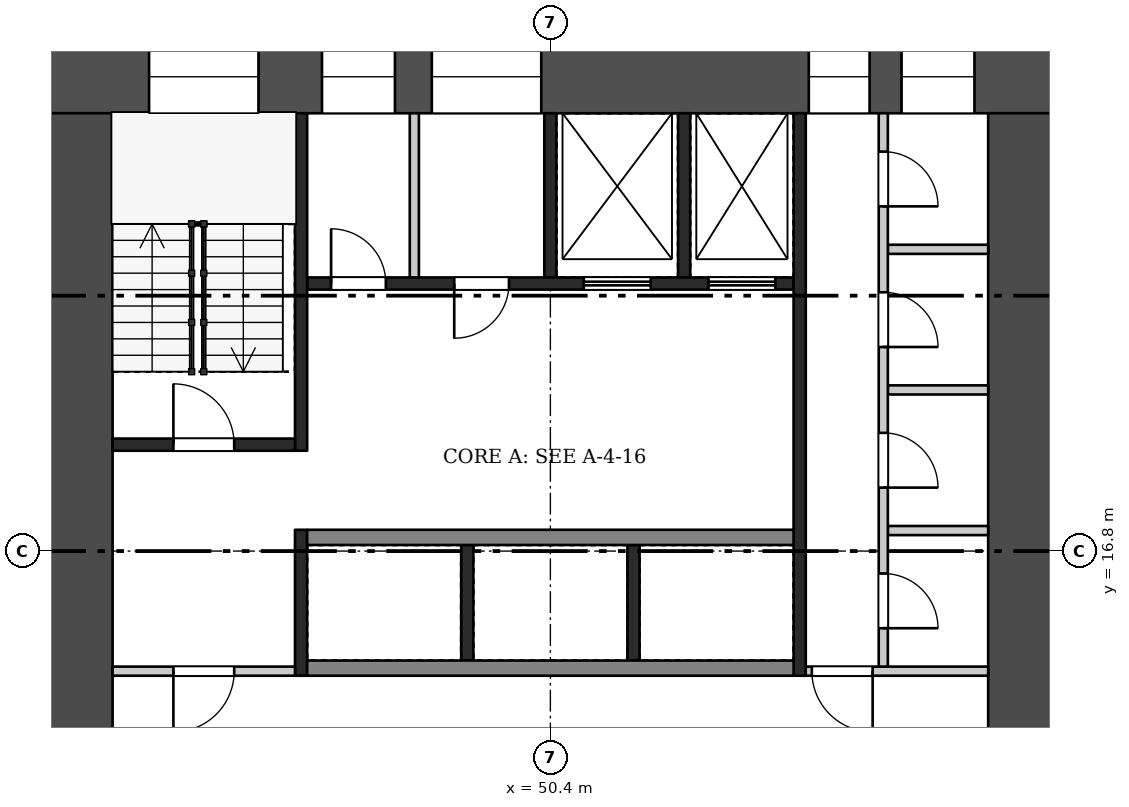
"""IFC4 building model, lengths in metres.
Left out: names, types, materials, properties, quantities, classifications, styles, units other than length and angle.
Written with IfcOpenShell. Run it as: python <this file> out.ifc"""

import sys

from ifc_helpers import new_model, si_unit, direction, frame, frame_2d, origin, place, context, subcontext, project, spatial, rectangle, extrude, element, fill, save


model = new_model("IFC4")
c1 = context("Model", 3, precision=1e-05, world=origin(), true_north=direction((0.0, 1.0)))
c2 = subcontext(c1, "Body", "Model", "MODEL_VIEW")
j1 = project(units=[si_unit("LENGTHUNIT", "METRE"), si_unit("PLANEANGLEUNIT", "RADIAN")], contexts=[c1])
p1 = place(None, origin())
s1 = spatial("IfcSite", under=j1, at=p1, CompositionType="ELEMENT")
p2 = place(p1, origin())
s2 = spatial("IfcBuilding", under=s1, at=p2, CompositionType="ELEMENT")
p3 = place(p2, frame((0.0, 0.0, 91.7)))
s3 = spatial("IfcBuildingStorey", under=s2, at=p3, CompositionType="ELEMENT", Elevation=91.7)
p4 = place(p3, frame((42.0, 24.6, 0.0), z_axis=(0.0, 0.0, 1.0), x_axis=(1.0, 0.0, 0.0)))
e1 = element("IfcWall", 1, at=p4, inside=s3, PredefinedType="SHEAR", context=c2, shape_type="SweptSolid", body=[
    extrude(rectangle(XDim=16.8, YDim=1.2, at=frame_2d((8.4, 0.0))), origin(), (0.0, 0.0, 1.0), 3.22),
])
p5 = place(p4, frame((1.8, 0.0, 0.5)))
e2 = element("IfcOpeningElement", 2, at=p5, cuts=e1, PredefinedType="OPENING", context=c2, shape_type="SweptSolid", body=[
    extrude(rectangle(XDim=1.8, YDim=2.4, at=frame_2d((0.9, 1.2))), frame((0.0, 0.61, 0.0), z_axis=(0.0, -1.0, 0.0), x_axis=(1.0, 0.0, 0.0)), (0.0, 0.0, 1.0), 1.22),
])
p6 = place(p4, frame((4.644, 0.0, 1.6)))
e3 = element("IfcOpeningElement", 3, at=p6, cuts=e1, PredefinedType="OPENING", context=c2, shape_type="SweptSolid", body=[
    extrude(rectangle(XDim=1.2, YDim=1.2, at=frame_2d((0.6, 0.6))), frame((0.0, 0.61, 0.0), z_axis=(0.0, -1.0, 0.0), x_axis=(1.0, 0.0, 0.0)), (0.0, 0.0, 1.0), 1.22),
])
p7 = place(p4, frame((6.45, 0.0, 1.6)))
e4 = element("IfcOpeningElement", 4, at=p7, cuts=e1, PredefinedType="OPENING", context=c2, shape_type="SweptSolid", body=[
    extrude(rectangle(XDim=1.8, YDim=1.2, at=frame_2d((0.9, 0.6))), frame((0.0, 0.61, 0.0), z_axis=(0.0, -1.0, 0.0), x_axis=(1.0, 0.0, 0.0)), (0.0, 0.0, 1.0), 1.22),
])
p8 = place(p4, frame((12.65, 0.0, 0.6)))
e5 = element("IfcOpeningElement", 5, at=p8, cuts=e1, PredefinedType="OPENING", context=c2, shape_type="SweptSolid", body=[
    extrude(rectangle(XDim=1.0, YDim=2.1, at=frame_2d((0.5, 1.05))), frame((0.0, 0.61, 0.0), z_axis=(0.0, -1.0, 0.0), x_axis=(1.0, 0.0, 0.0)), (0.0, 0.0, 1.0), 1.22),
])
p9 = place(p4, frame((14.175, 0.0, 1.6)))
e6 = element("IfcOpeningElement", 6, at=p9, cuts=e1, PredefinedType="OPENING", context=c2, shape_type="SweptSolid", body=[
    extrude(rectangle(XDim=1.2, YDim=1.2, at=frame_2d((0.6, 0.6))), frame((0.0, 0.61, 0.0), z_axis=(0.0, -1.0, 0.0), x_axis=(1.0, 0.0, 0.0)), (0.0, 0.0, 1.0), 1.22),
])
p10 = place(p3, frame((42.6, 9.6, 0.0), z_axis=(0.0, 0.0, 1.0), x_axis=(0.0, 1.0, 0.0)))
e7 = element("IfcWall", 7, at=p10, inside=s3, PredefinedType="SHEAR", context=c2, shape_type="SweptSolid", body=[
    extrude(rectangle(XDim=14.4, YDim=1.2, at=frame_2d((7.2, 0.0))), origin(), (0.0, 0.0, 1.0), 3.22),
])
p11 = place(p10, frame((2.1, 0.0, 0.0)))
e8 = element("IfcOpeningElement", 8, at=p11, cuts=e7, PredefinedType="OPENING", context=c2, shape_type="SweptSolid", body=[
    extrude(rectangle(XDim=1.8, YDim=2.1, at=frame_2d((0.9, 1.05))), frame((0.0, 0.61, 0.0), z_axis=(0.0, -1.0, 0.0), x_axis=(1.0, 0.0, 0.0)), (0.0, 0.0, 1.0), 1.22),
])
p12 = place(p3, frame((58.2, 9.6, 0.0), z_axis=(0.0, 0.0, 1.0), x_axis=(0.0, 1.0, 0.0)))
e9 = element("IfcWall", 9, at=p12, inside=s3, PredefinedType="SHEAR", context=c2, shape_type="SweptSolid", body=[
    extrude(rectangle(XDim=14.4, YDim=1.2, at=frame_2d((7.2, 0.0))), origin(), (0.0, 0.0, 1.0), 3.22),
])
p13 = place(p12, frame((2.1, 0.0, 0.0)))
e10 = element("IfcOpeningElement", 10, at=p13, cuts=e9, PredefinedType="OPENING", context=c2, shape_type="SweptSolid", body=[
    extrude(rectangle(XDim=1.8, YDim=2.1, at=frame_2d((0.9, 1.05))), frame((0.0, 0.61, 0.0), z_axis=(0.0, -1.0, 0.0), x_axis=(1.0, 0.0, 0.0)), (0.0, 0.0, 1.0), 1.22),
])
for number, where, z_axis, x_axis in (
    (11, (49.033, 15.0, 0.0), (0.0, 0.0, 1.0), (0.0, 1.0, 0.0)),
    (12, (51.767, 15.0, 0.0), (0.0, 0.0, 1.0), (0.0, 1.0, 0.0)),
):
    element("IfcWall", number, at=place(p3, frame(where, z_axis=z_axis, x_axis=x_axis)), inside=s3, PredefinedType="SHEAR", context=c2, shape_type="SweptSolid", body=[
        extrude(rectangle(XDim=1.9, YDim=0.2, at=frame_2d((0.95, 0.0))), origin(), (0.0, 0.0, 1.0), 3.22),
    ])
for number, where, z_axis, x_axis in (
    (13, (46.4, 14.875, 0.0), (0.0, 0.0, 1.0), (1.0, 0.0, 0.0)),
    (14, (46.4, 17.025, 0.0), (0.0, 0.0, 1.0), (1.0, 0.0, 0.0)),
):
    element("IfcWall", number, at=place(p3, frame(where, z_axis=z_axis, x_axis=x_axis)), inside=s3, PredefinedType="SHEAR", context=c2, shape_type="SweptSolid", body=[
        extrude(rectangle(XDim=8.0, YDim=0.25, at=frame_2d((4.0, 0.0))), origin(), (0.0, 0.0, 1.0), 3.22),
    ])
for number, where, z_axis, x_axis in (
    (15, (50.4, 21.3, 0.0), (0.0, 0.0, 1.0), (0.0, 1.0, 0.0)),
    (16, (52.6, 21.3, 0.0), (0.0, 0.0, 1.0), (0.0, 1.0, 0.0)),
):
    element("IfcWall", number, at=place(p3, frame(where, z_axis=z_axis, x_axis=x_axis)), inside=s3, PredefinedType="SHEAR", context=c2, shape_type="SweptSolid", body=[
        extrude(rectangle(XDim=2.7, YDim=0.2, at=frame_2d((1.35, 0.0))), origin(), (0.0, 0.0, 1.0), 3.22),
    ])
p14 = place(p3, frame((48.163, 21.3, 0.0), z_axis=(0.0, 0.0, 1.0), x_axis=(0.0, 1.0, 0.0)))
e17 = element("IfcWall", 17, at=p14, inside=s3, PredefinedType="PARTITIONING", context=c2, shape_type="SweptSolid", body=[
    extrude(rectangle(XDim=2.7, YDim=0.15, at=frame_2d((1.35, 0.0))), origin(), (0.0, 0.0, 1.0), 3.22),
])
p15 = place(p3, frame((46.4, 21.2, 0.0), z_axis=(0.0, 0.0, 1.0), x_axis=(1.0, 0.0, 0.0)))
e18 = element("IfcWall", 18, at=p15, inside=s3, PredefinedType="SHEAR", context=c2, shape_type="SweptSolid", body=[
    extrude(rectangle(XDim=8.0, YDim=0.2, at=frame_2d((4.0, 0.0))), origin(), (0.0, 0.0, 1.0), 3.22),
])
p16 = place(p15, frame((0.394, 0.0, 0.0)))
e19 = element("IfcOpeningElement", 19, at=p16, cuts=e18, PredefinedType="OPENING", context=c2, shape_type="SweptSolid", body=[
    extrude(rectangle(XDim=0.9, YDim=2.1, at=frame_2d((0.45, 1.05))), frame((0.0, 0.11, 0.0), z_axis=(0.0, -1.0, 0.0), x_axis=(1.0, 0.0, 0.0)), (0.0, 0.0, 1.0), 0.22),
])
p17 = place(p15, frame((2.419, 0.0, 0.0)))
e20 = element("IfcOpeningElement", 20, at=p17, cuts=e18, PredefinedType="OPENING", context=c2, shape_type="SweptSolid", body=[
    extrude(rectangle(XDim=0.9, YDim=2.1, at=frame_2d((0.45, 1.05))), frame((0.0, 0.11, 0.0), z_axis=(0.0, -1.0, 0.0), x_axis=(1.0, 0.0, 0.0)), (0.0, 0.0, 1.0), 0.22),
])
p18 = place(p15, frame((4.55, 0.0, 0.0)))
e21 = element("IfcOpeningElement", 21, at=p18, cuts=e18, PredefinedType="OPENING", context=c2, shape_type="SweptSolid", body=[
    extrude(rectangle(XDim=1.1, YDim=2.1, at=frame_2d((0.55, 1.05))), frame((0.0, 0.11, 0.0), z_axis=(0.0, -1.0, 0.0), x_axis=(1.0, 0.0, 0.0)), (0.0, 0.0, 1.0), 0.22),
])
p19 = place(p15, frame((6.6, 0.0, 0.0)))
e22 = element("IfcOpeningElement", 22, at=p19, cuts=e18, PredefinedType="OPENING", context=c2, shape_type="SweptSolid", body=[
    extrude(rectangle(XDim=1.1, YDim=2.1, at=frame_2d((0.55, 1.05))), frame((0.0, 0.11, 0.0), z_axis=(0.0, -1.0, 0.0), x_axis=(1.0, 0.0, 0.0)), (0.0, 0.0, 1.0), 0.22),
])
p20 = place(p3, frame((46.3, 14.75, 0.0), z_axis=(0.0, 0.0, 1.0), x_axis=(0.0, 1.0, 0.0)))
e23 = element("IfcWall", 23, at=p20, inside=s3, PredefinedType="SHEAR", context=c2, shape_type="SweptSolid", body=[
    extrude(rectangle(XDim=2.4, YDim=0.2, at=frame_2d((1.2, 0.0))), origin(), (0.0, 0.0, 1.0), 3.22),
])
p21 = place(p3, frame((46.3, 18.45, 0.0), z_axis=(0.0, 0.0, 1.0), x_axis=(0.0, 1.0, 0.0)))
e24 = element("IfcWall", 24, at=p21, inside=s3, PredefinedType="SHEAR", context=c2, shape_type="SweptSolid", body=[
    extrude(rectangle(XDim=5.55, YDim=0.2, at=frame_2d((2.775, 0.0))), origin(), (0.0, 0.0, 1.0), 3.22),
])
p22 = place(p3, frame((43.2, 14.825, 0.0), z_axis=(0.0, 0.0, 1.0), x_axis=(1.0, 0.0, 0.0)))
e25 = element("IfcWall", 25, at=p22, inside=s3, PredefinedType="PARTITIONING", context=c2, shape_type="SweptSolid", body=[
    extrude(rectangle(XDim=3.0, YDim=0.15, at=frame_2d((1.5, 0.0))), origin(), (0.0, 0.0, 1.0), 3.22),
])
p23 = place(p22, frame((1.0, 0.0, 0.0)))
e26 = element("IfcOpeningElement", 26, at=p23, cuts=e25, PredefinedType="OPENING", context=c2, shape_type="SweptSolid", body=[
    extrude(rectangle(XDim=1.0, YDim=2.1, at=frame_2d((0.5, 1.05))), frame((0.0, 0.085, 0.0), z_axis=(0.0, -1.0, 0.0), x_axis=(1.0, 0.0, 0.0)), (0.0, 0.0, 1.0), 0.17),
])
p24 = place(p3, frame((43.2, 18.55, 0.0), z_axis=(0.0, 0.0, 1.0), x_axis=(1.0, 0.0, 0.0)))
e27 = element("IfcWall", 27, at=p24, inside=s3, PredefinedType="SHEAR", context=c2, shape_type="SweptSolid", body=[
    extrude(rectangle(XDim=3.0, YDim=0.2, at=frame_2d((1.5, 0.0))), origin(), (0.0, 0.0, 1.0), 3.22),
])
p25 = place(p24, frame((1.0, 0.0, 0.0)))
e28 = element("IfcOpeningElement", 28, at=p25, cuts=e27, PredefinedType="OPENING", context=c2, shape_type="SweptSolid", body=[
    extrude(rectangle(XDim=1.0, YDim=2.1, at=frame_2d((0.5, 1.05))), frame((0.0, 0.11, 0.0), z_axis=(0.0, -1.0, 0.0), x_axis=(1.0, 0.0, 0.0)), (0.0, 0.0, 1.0), 0.22),
])
p26 = place(p3, frame((54.5, 14.75, 0.0), z_axis=(0.0, 0.0, 1.0), x_axis=(0.0, 1.0, 0.0)))
e29 = element("IfcWall", 29, at=p26, inside=s3, PredefinedType="SHEAR", context=c2, shape_type="SweptSolid", body=[
    extrude(rectangle(XDim=9.25, YDim=0.2, at=frame_2d((4.625, 0.0))), origin(), (0.0, 0.0, 1.0), 3.22),
])
p27 = place(p3, frame((54.6, 14.825, 0.0), z_axis=(0.0, 0.0, 1.0), x_axis=(1.0, 0.0, 0.0)))
e30 = element("IfcWall", 30, at=p27, inside=s3, PredefinedType="PARTITIONING", context=c2, shape_type="SweptSolid", body=[
    extrude(rectangle(XDim=3.0, YDim=0.15, at=frame_2d((1.5, 0.0))), origin(), (0.0, 0.0, 1.0), 3.22),
])
p28 = place(p27, frame((0.1, 0.0, 0.0)))
e31 = element("IfcOpeningElement", 31, at=p28, cuts=e30, PredefinedType="OPENING", context=c2, shape_type="SweptSolid", body=[
    extrude(rectangle(XDim=1.0, YDim=2.1, at=frame_2d((0.5, 1.05))), frame((0.0, 0.085, 0.0), z_axis=(0.0, -1.0, 0.0), x_axis=(1.0, 0.0, 0.0)), (0.0, 0.0, 1.0), 0.17),
])
for number, where, z_axis, x_axis in (
    (32, (55.95, 17.137, 0.0), (0.0, 0.0, 1.0), (1.0, 0.0, 0.0)),
    (33, (55.95, 19.45, 0.0), (0.0, 0.0, 1.0), (1.0, 0.0, 0.0)),
    (34, (55.95, 21.762, 0.0), (0.0, 0.0, 1.0), (1.0, 0.0, 0.0)),
):
    element("IfcWall", number, at=place(p3, frame(where, z_axis=z_axis, x_axis=x_axis)), inside=s3, PredefinedType="PARTITIONING", context=c2, shape_type="SweptSolid", body=[
        extrude(rectangle(XDim=1.65, YDim=0.15, at=frame_2d((0.825, 0.0))), origin(), (0.0, 0.0, 1.0), 3.22),
    ])
p29 = place(p3, frame((55.875, 14.9, 0.0), z_axis=(0.0, 0.0, 1.0), x_axis=(0.0, 1.0, 0.0)))
e35 = element("IfcWall", 35, at=p29, inside=s3, PredefinedType="PARTITIONING", context=c2, shape_type="SweptSolid", body=[
    extrude(rectangle(XDim=9.1, YDim=0.15, at=frame_2d((4.55, 0.0))), origin(), (0.0, 0.0, 1.0), 3.22),
])
p30 = place(p29, frame((0.631, 0.0, 0.0)))
e36 = element("IfcOpeningElement", 36, at=p30, cuts=e35, PredefinedType="OPENING", context=c2, shape_type="SweptSolid", body=[
    extrude(rectangle(XDim=0.9, YDim=2.1, at=frame_2d((0.45, 1.05))), frame((0.0, 0.085, 0.0), z_axis=(0.0, -1.0, 0.0), x_axis=(1.0, 0.0, 0.0)), (0.0, 0.0, 1.0), 0.17),
])
p31 = place(p29, frame((2.944, 0.0, 0.0)))
e37 = element("IfcOpeningElement", 37, at=p31, cuts=e35, PredefinedType="OPENING", context=c2, shape_type="SweptSolid", body=[
    extrude(rectangle(XDim=0.9, YDim=2.1, at=frame_2d((0.45, 1.05))), frame((0.0, 0.085, 0.0), z_axis=(0.0, -1.0, 0.0), x_axis=(1.0, 0.0, 0.0)), (0.0, 0.0, 1.0), 0.17),
])
p32 = place(p29, frame((5.256, 0.0, 0.0)))
e38 = element("IfcOpeningElement", 38, at=p32, cuts=e35, PredefinedType="OPENING", context=c2, shape_type="SweptSolid", body=[
    extrude(rectangle(XDim=0.9, YDim=2.1, at=frame_2d((0.45, 1.05))), frame((0.0, 0.085, 0.0), z_axis=(0.0, -1.0, 0.0), x_axis=(1.0, 0.0, 0.0)), (0.0, 0.0, 1.0), 0.17),
])
p33 = place(p29, frame((7.569, 0.0, 0.0)))
e39 = element("IfcOpeningElement", 39, at=p33, cuts=e35, PredefinedType="OPENING", context=c2, shape_type="SweptSolid", body=[
    extrude(rectangle(XDim=0.9, YDim=2.1, at=frame_2d((0.45, 1.05))), frame((0.0, 0.085, 0.0), z_axis=(0.0, -1.0, 0.0), x_axis=(1.0, 0.0, 0.0)), (0.0, 0.0, 1.0), 0.17),
])
p34 = place(p16, origin())
e40 = element("IfcDoor", 40, at=p34, inside=s3, OperationType="SINGLE_SWING_LEFT", PredefinedType="DOOR", context=c2, shape_type="SweptSolid", body=[
    extrude(rectangle(XDim=0.9, YDim=2.1, at=frame_2d((0.45, 1.05))), frame((0.0, 0.025, 0.0), z_axis=(0.0, -1.0, 0.0), x_axis=(1.0, 0.0, 0.0)), (0.0, 0.0, 1.0), 0.05),
])
fill(e19, e40)
p35 = place(p17, frame((0.9, 0.0, 0.0), z_axis=(0.0, 0.0, 1.0), x_axis=(-1.0, 0.0, 0.0)))
e41 = element("IfcDoor", 41, at=p35, inside=s3, OperationType="SINGLE_SWING_RIGHT", PredefinedType="DOOR", context=c2, shape_type="SweptSolid", body=[
    extrude(rectangle(XDim=0.9, YDim=2.1, at=frame_2d((0.45, 1.05))), frame((0.0, 0.025, 0.0), z_axis=(0.0, -1.0, 0.0), x_axis=(1.0, 0.0, 0.0)), (0.0, 0.0, 1.0), 0.05),
])
fill(e20, e41)
p36 = place(p18, origin())
e42 = element("IfcDoor", 42, at=p36, inside=s3, OperationType="DOUBLE_DOOR_SLIDING", PredefinedType="DOOR", context=c2, shape_type="SweptSolid", body=[
    extrude(rectangle(XDim=1.1, YDim=2.1, at=frame_2d((0.55, 1.05))), frame((0.0, 0.025, 0.0), z_axis=(0.0, -1.0, 0.0), x_axis=(1.0, 0.0, 0.0)), (0.0, 0.0, 1.0), 0.05),
])
fill(e21, e42)
p37 = place(p19, origin())
e43 = element("IfcDoor", 43, at=p37, inside=s3, OperationType="DOUBLE_DOOR_SLIDING", PredefinedType="DOOR", context=c2, shape_type="SweptSolid", body=[
    extrude(rectangle(XDim=1.1, YDim=2.1, at=frame_2d((0.55, 1.05))), frame((0.0, 0.025, 0.0), z_axis=(0.0, -1.0, 0.0), x_axis=(1.0, 0.0, 0.0)), (0.0, 0.0, 1.0), 0.05),
])
fill(e22, e43)
p38 = place(p23, frame((1.0, 0.0, 0.0), z_axis=(0.0, 0.0, 1.0), x_axis=(-1.0, 0.0, 0.0)))
e44 = element("IfcDoor", 44, at=p38, inside=s3, OperationType="SINGLE_SWING_RIGHT", PredefinedType="DOOR", context=c2, shape_type="SweptSolid", body=[
    extrude(rectangle(XDim=1.0, YDim=2.1, at=frame_2d((0.5, 1.05))), frame((0.0, 0.025, 0.0), z_axis=(0.0, -1.0, 0.0), x_axis=(1.0, 0.0, 0.0)), (0.0, 0.0, 1.0), 0.05),
])
fill(e26, e44)
p39 = place(p25, origin())
e45 = element("IfcDoor", 45, at=p39, inside=s3, OperationType="SINGLE_SWING_LEFT", PredefinedType="DOOR", context=c2, shape_type="SweptSolid", body=[
    extrude(rectangle(XDim=1.0, YDim=2.1, at=frame_2d((0.5, 1.05))), frame((0.0, 0.025, 0.0), z_axis=(0.0, -1.0, 0.0), x_axis=(1.0, 0.0, 0.0)), (0.0, 0.0, 1.0), 0.05),
])
fill(e28, e45)
p40 = place(p28, frame((1.0, 0.0, 0.0), z_axis=(0.0, 0.0, 1.0), x_axis=(-1.0, 0.0, 0.0)))
e46 = element("IfcDoor", 46, at=p40, inside=s3, OperationType="SINGLE_SWING_LEFT", PredefinedType="DOOR", context=c2, shape_type="SweptSolid", body=[
    extrude(rectangle(XDim=1.0, YDim=2.1, at=frame_2d((0.5, 1.05))), frame((0.0, 0.025, 0.0), z_axis=(0.0, -1.0, 0.0), x_axis=(1.0, 0.0, 0.0)), (0.0, 0.0, 1.0), 0.05),
])
fill(e31, e46)
p41 = place(p30, frame((0.9, 0.0, 0.0), z_axis=(0.0, 0.0, 1.0), x_axis=(-1.0, 0.0, 0.0)))
e47 = element("IfcDoor", 47, at=p41, inside=s3, OperationType="SINGLE_SWING_RIGHT", PredefinedType="DOOR", context=c2, shape_type="SweptSolid", body=[
    extrude(rectangle(XDim=0.9, YDim=2.1, at=frame_2d((0.45, 1.05))), frame((0.0, 0.025, 0.0), z_axis=(0.0, -1.0, 0.0), x_axis=(1.0, 0.0, 0.0)), (0.0, 0.0, 1.0), 0.05),
])
fill(e36, e47)
p42 = place(p31, frame((0.9, 0.0, 0.0), z_axis=(0.0, 0.0, 1.0), x_axis=(-1.0, 0.0, 0.0)))
e48 = element("IfcDoor", 48, at=p42, inside=s3, OperationType="SINGLE_SWING_RIGHT", PredefinedType="DOOR", context=c2, shape_type="SweptSolid", body=[
    extrude(rectangle(XDim=0.9, YDim=2.1, at=frame_2d((0.45, 1.05))), frame((0.0, 0.025, 0.0), z_axis=(0.0, -1.0, 0.0), x_axis=(1.0, 0.0, 0.0)), (0.0, 0.0, 1.0), 0.05),
])
fill(e37, e48)
p43 = place(p32, frame((0.9, 0.0, 0.0), z_axis=(0.0, 0.0, 1.0), x_axis=(-1.0, 0.0, 0.0)))
e49 = element("IfcDoor", 49, at=p43, inside=s3, OperationType="SINGLE_SWING_RIGHT", PredefinedType="DOOR", context=c2, shape_type="SweptSolid", body=[
    extrude(rectangle(XDim=0.9, YDim=2.1, at=frame_2d((0.45, 1.05))), frame((0.0, 0.025, 0.0), z_axis=(0.0, -1.0, 0.0), x_axis=(1.0, 0.0, 0.0)), (0.0, 0.0, 1.0), 0.05),
])
fill(e38, e49)
p44 = place(p33, frame((0.9, 0.0, 0.0), z_axis=(0.0, 0.0, 1.0), x_axis=(-1.0, 0.0, 0.0)))
e50 = element("IfcDoor", 50, at=p44, inside=s3, OperationType="SINGLE_SWING_RIGHT", PredefinedType="DOOR", context=c2, shape_type="SweptSolid", body=[
    extrude(rectangle(XDim=0.9, YDim=2.1, at=frame_2d((0.45, 1.05))), frame((0.0, 0.025, 0.0), z_axis=(0.0, -1.0, 0.0), x_axis=(1.0, 0.0, 0.0)), (0.0, 0.0, 1.0), 0.05),
])
fill(e39, e50)
p45 = place(p5, origin())
e51 = element("IfcWindow", 51, at=p45, inside=s3, PartitioningType="SINGLE_PANEL", PredefinedType="WINDOW", context=c2, shape_type="SweptSolid", body=[
    extrude(rectangle(XDim=1.8, YDim=2.4, at=frame_2d((0.9, 1.2))), frame((0.0, 0.03, 0.0), z_axis=(0.0, -1.0, 0.0), x_axis=(1.0, 0.0, 0.0)), (0.0, 0.0, 1.0), 0.06),
])
fill(e2, e51)
p46 = place(p6, origin())
e52 = element("IfcWindow", 52, at=p46, inside=s3, PartitioningType="SINGLE_PANEL", PredefinedType="WINDOW", context=c2, shape_type="SweptSolid", body=[
    extrude(rectangle(XDim=1.2, YDim=1.2, at=frame_2d((0.6, 0.6))), frame((0.0, 0.03, 0.0), z_axis=(0.0, -1.0, 0.0), x_axis=(1.0, 0.0, 0.0)), (0.0, 0.0, 1.0), 0.06),
])
fill(e3, e52)
p47 = place(p7, origin())
e53 = element("IfcWindow", 53, at=p47, inside=s3, PartitioningType="SINGLE_PANEL", PredefinedType="WINDOW", context=c2, shape_type="SweptSolid", body=[
    extrude(rectangle(XDim=1.8, YDim=1.2, at=frame_2d((0.9, 0.6))), frame((0.0, 0.03, 0.0), z_axis=(0.0, -1.0, 0.0), x_axis=(1.0, 0.0, 0.0)), (0.0, 0.0, 1.0), 0.06),
])
fill(e4, e53)
p48 = place(p8, origin())
e54 = element("IfcWindow", 54, at=p48, inside=s3, PartitioningType="SINGLE_PANEL", PredefinedType="WINDOW", context=c2, shape_type="SweptSolid", body=[
    extrude(rectangle(XDim=1.0, YDim=2.1, at=frame_2d((0.5, 1.05))), frame((0.0, 0.03, 0.0), z_axis=(0.0, -1.0, 0.0), x_axis=(1.0, 0.0, 0.0)), (0.0, 0.0, 1.0), 0.06),
])
fill(e5, e54)
p49 = place(p9, origin())
e55 = element("IfcWindow", 55, at=p49, inside=s3, PartitioningType="SINGLE_PANEL", PredefinedType="WINDOW", context=c2, shape_type="SweptSolid", body=[
    extrude(rectangle(XDim=1.2, YDim=1.2, at=frame_2d((0.6, 0.6))), frame((0.0, 0.03, 0.0), z_axis=(0.0, -1.0, 0.0), x_axis=(1.0, 0.0, 0.0)), (0.0, 0.0, 1.0), 0.06),
])
fill(e6, e55)
save(model, sys.argv[1])
